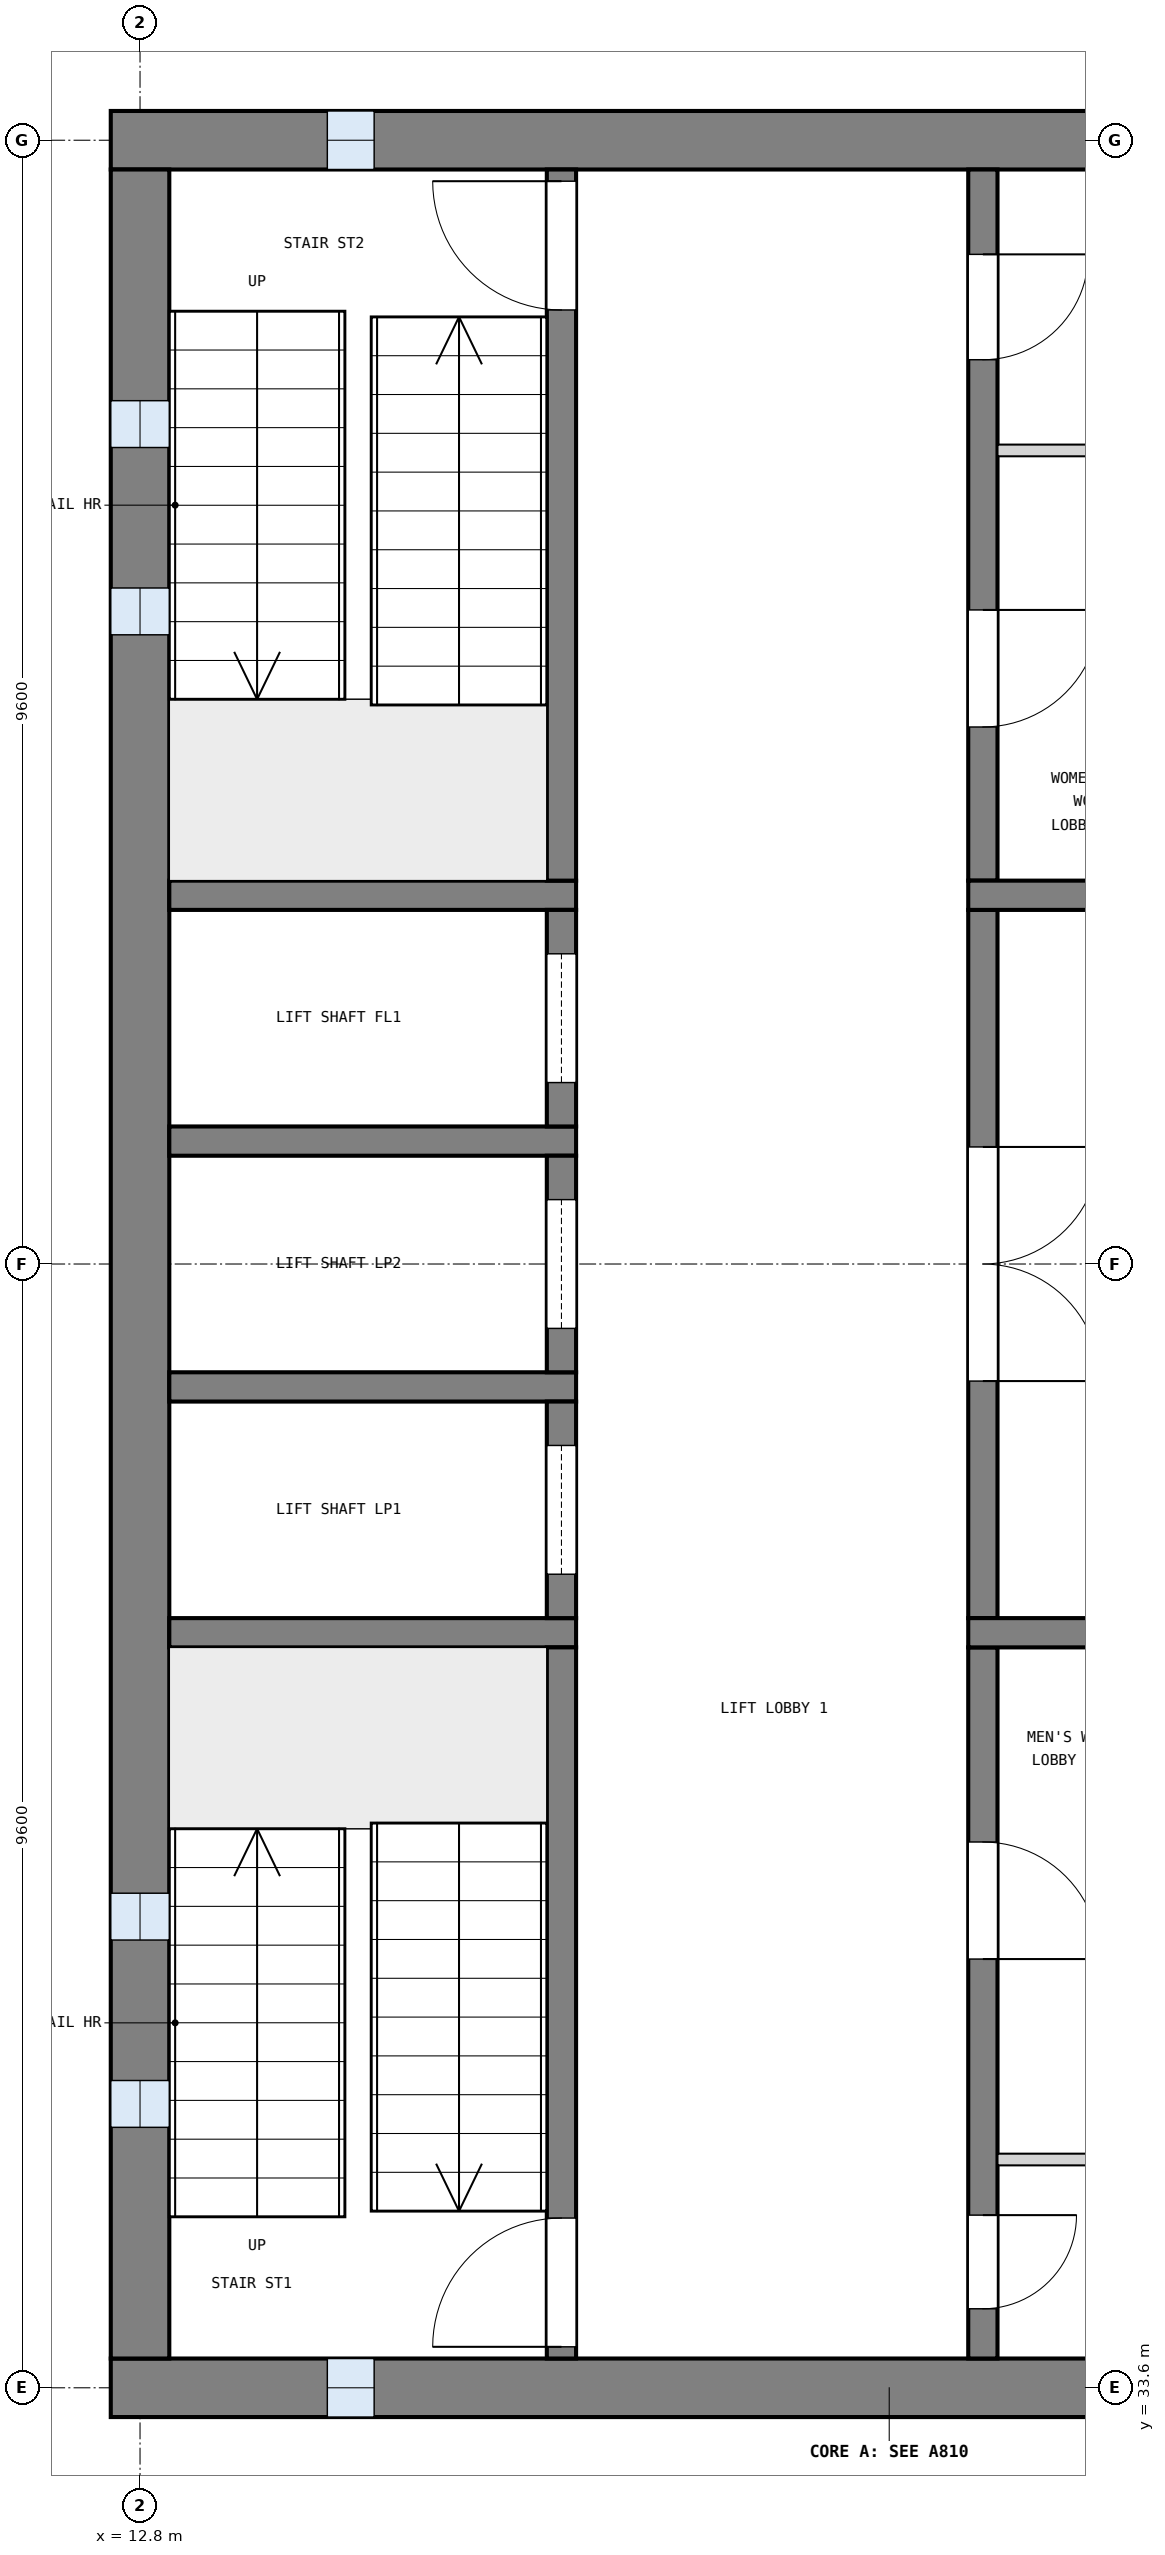
"""IFC4 building model, lengths in metres.
Left out: names, types, materials, properties, quantities, classifications, styles, units other than length and angle.
Written with IfcOpenShell. Run it as: python <this file> out.ifc"""

import sys

from ifc_helpers import new_model, si_unit, direction, frame, frame_2d, origin, place, context, subcontext, project, spatial, rectangle, extrude, element, fill, save


model = new_model("IFC4")
c1 = context("Model", 3, precision=1e-05, world=origin(), true_north=direction((0.0, 1.0)))
c2 = subcontext(c1, "Body", "Model", "MODEL_VIEW")
j1 = project(units=[si_unit("LENGTHUNIT", "METRE"), si_unit("PLANEANGLEUNIT", "RADIAN")], contexts=[c1])
p1 = place(None, origin())
s1 = spatial("IfcSite", under=j1, at=p1, CompositionType="ELEMENT")
p2 = place(p1, origin())
s2 = spatial("IfcBuilding", under=s1, at=p2, CompositionType="ELEMENT")
p3 = place(p2, frame((0.0, 0.0, 32.7)))
s3 = spatial("IfcBuildingStorey", under=s2, at=p3, CompositionType="ELEMENT", Elevation=32.7)
p4 = place(p3, frame((12.55, 52.8, 0.0), z_axis=(0.0, 0.0, 1.0), x_axis=(1.0, 0.0, 0.0)))
e1 = element("IfcWall", 1, at=p4, inside=s3, PredefinedType="SHEAR", context=c2, shape_type="SweptSolid", body=[
    extrude(rectangle(XDim=13.3, YDim=0.5, at=frame_2d((6.65, 0.0))), origin(), (0.0, 0.0, 1.0), 3.9),
])
p5 = place(p4, frame((1.85, 0.0, 1.0)))
e2 = element("IfcOpeningElement", 2, at=p5, cuts=e1, PredefinedType="OPENING", context=c2, shape_type="SweptSolid", body=[
    extrude(rectangle(XDim=0.4, YDim=2.0, at=frame_2d((0.2, 1.0))), frame((0.0, 0.26, 0.0), z_axis=(0.0, -1.0, 0.0), x_axis=(1.0, 0.0, 0.0)), (0.0, 0.0, 1.0), 0.52),
])
p6 = place(p3, frame((12.55, 33.6, 0.0), z_axis=(0.0, 0.0, 1.0), x_axis=(1.0, 0.0, 0.0)))
e3 = element("IfcWall", 3, at=p6, inside=s3, PredefinedType="SHEAR", context=c2, shape_type="SweptSolid", body=[
    extrude(rectangle(XDim=13.3, YDim=0.5, at=frame_2d((6.65, 0.0))), origin(), (0.0, 0.0, 1.0), 3.9),
])
p7 = place(p6, frame((1.85, 0.0, 1.0)))
e4 = element("IfcOpeningElement", 4, at=p7, cuts=e3, PredefinedType="OPENING", context=c2, shape_type="SweptSolid", body=[
    extrude(rectangle(XDim=0.4, YDim=2.0, at=frame_2d((0.2, 1.0))), frame((0.0, 0.26, 0.0), z_axis=(0.0, -1.0, 0.0), x_axis=(1.0, 0.0, 0.0)), (0.0, 0.0, 1.0), 0.52),
])
p8 = place(p3, frame((12.8, 33.85, 0.0), z_axis=(0.0, 0.0, 1.0), x_axis=(0.0, 1.0, 0.0)))
e5 = element("IfcWall", 5, at=p8, inside=s3, PredefinedType="SHEAR", context=c2, shape_type="SweptSolid", body=[
    extrude(rectangle(XDim=18.7, YDim=0.5, at=frame_2d((9.35, 0.0))), origin(), (0.0, 0.0, 1.0), 3.9),
])
p9 = place(p8, frame((1.975, 0.0, 1.0)))
e6 = element("IfcOpeningElement", 6, at=p9, cuts=e5, PredefinedType="OPENING", context=c2, shape_type="SweptSolid", body=[
    extrude(rectangle(XDim=0.4, YDim=2.0, at=frame_2d((0.2, 1.0))), frame((0.0, 0.26, 0.0), z_axis=(0.0, -1.0, 0.0), x_axis=(1.0, 0.0, 0.0)), (0.0, 0.0, 1.0), 0.52),
])
p10 = place(p8, frame((3.575, 0.0, 1.0)))
e7 = element("IfcOpeningElement", 7, at=p10, cuts=e5, PredefinedType="OPENING", context=c2, shape_type="SweptSolid", body=[
    extrude(rectangle(XDim=0.4, YDim=2.0, at=frame_2d((0.2, 1.0))), frame((0.0, 0.26, 0.0), z_axis=(0.0, -1.0, 0.0), x_axis=(1.0, 0.0, 0.0)), (0.0, 0.0, 1.0), 0.52),
])
p11 = place(p8, frame((14.725, 0.0, 1.0)))
e8 = element("IfcOpeningElement", 8, at=p11, cuts=e5, PredefinedType="OPENING", context=c2, shape_type="SweptSolid", body=[
    extrude(rectangle(XDim=0.4, YDim=2.0, at=frame_2d((0.2, 1.0))), frame((0.0, 0.26, 0.0), z_axis=(0.0, -1.0, 0.0), x_axis=(1.0, 0.0, 0.0)), (0.0, 0.0, 1.0), 0.52),
])
p12 = place(p8, frame((16.325, 0.0, 1.0)))
e9 = element("IfcOpeningElement", 9, at=p12, cuts=e5, PredefinedType="OPENING", context=c2, shape_type="SweptSolid", body=[
    extrude(rectangle(XDim=0.4, YDim=2.0, at=frame_2d((0.2, 1.0))), frame((0.0, 0.26, 0.0), z_axis=(0.0, -1.0, 0.0), x_axis=(1.0, 0.0, 0.0)), (0.0, 0.0, 1.0), 0.52),
])
for number, where, z_axis, x_axis in (
    (10, (13.05, 40.05, 0.0), (0.0, 0.0, 1.0), (1.0, 0.0, 0.0)),
    (11, (13.05, 42.15, 0.0), (0.0, 0.0, 1.0), (1.0, 0.0, 0.0)),
    (12, (13.05, 44.25, 0.0), (0.0, 0.0, 1.0), (1.0, 0.0, 0.0)),
    (13, (13.05, 46.35, 0.0), (0.0, 0.0, 1.0), (1.0, 0.0, 0.0)),
):
    element("IfcWall", number, at=place(p3, frame(where, z_axis=z_axis, x_axis=x_axis)), inside=s3, PredefinedType="SOLIDWALL", context=c2, shape_type="SweptSolid", body=[
        extrude(rectangle(XDim=3.475, YDim=0.25, at=frame_2d((1.737, 0.0))), origin(), (0.0, 0.0, 1.0), 3.6),
    ])
p13 = place(p3, frame((16.4, 33.85, 0.0), z_axis=(0.0, 0.0, 1.0), x_axis=(0.0, 1.0, 0.0)))
e14 = element("IfcWall", 14, at=p13, inside=s3, PredefinedType="SOLIDWALL", context=c2, shape_type="SweptSolid", body=[
    extrude(rectangle(XDim=6.075, YDim=0.25, at=frame_2d((3.038, 0.0))), origin(), (0.0, 0.0, 1.0), 3.6),
])
p14 = place(p13, frame((0.1, 0.0, 0.0)))
e15 = element("IfcOpeningElement", 15, at=p14, cuts=e14, PredefinedType="OPENING", context=c2, shape_type="SweptSolid", body=[
    extrude(rectangle(XDim=1.1, YDim=2.1, at=frame_2d((0.55, 1.05))), frame((0.0, 0.135, 0.0), z_axis=(0.0, -1.0, 0.0), x_axis=(1.0, 0.0, 0.0)), (0.0, 0.0, 1.0), 0.27),
])
p15 = place(p3, frame((16.4, 40.175, 0.0), z_axis=(0.0, 0.0, 1.0), x_axis=(0.0, 1.0, 0.0)))
e16 = element("IfcWall", 16, at=p15, inside=s3, PredefinedType="SOLIDWALL", context=c2, shape_type="SweptSolid", body=[
    extrude(rectangle(XDim=1.85, YDim=0.25, at=frame_2d((0.925, 0.0))), origin(), (0.0, 0.0, 1.0), 3.6),
])
p16 = place(p15, frame((0.375, 0.0, 0.0)))
e17 = element("IfcOpeningElement", 17, at=p16, cuts=e16, PredefinedType="OPENING", context=c2, shape_type="SweptSolid", body=[
    extrude(rectangle(XDim=1.1, YDim=2.1, at=frame_2d((0.55, 1.05))), frame((0.0, 0.135, 0.0), z_axis=(0.0, -1.0, 0.0), x_axis=(1.0, 0.0, 0.0)), (0.0, 0.0, 1.0), 0.27),
])
p17 = place(p3, frame((16.4, 42.275, 0.0), z_axis=(0.0, 0.0, 1.0), x_axis=(0.0, 1.0, 0.0)))
e18 = element("IfcWall", 18, at=p17, inside=s3, PredefinedType="SOLIDWALL", context=c2, shape_type="SweptSolid", body=[
    extrude(rectangle(XDim=1.85, YDim=0.25, at=frame_2d((0.925, 0.0))), origin(), (0.0, 0.0, 1.0), 3.6),
])
p18 = place(p17, frame((0.375, 0.0, 0.0)))
e19 = element("IfcOpeningElement", 19, at=p18, cuts=e18, PredefinedType="OPENING", context=c2, shape_type="SweptSolid", body=[
    extrude(rectangle(XDim=1.1, YDim=2.1, at=frame_2d((0.55, 1.05))), frame((0.0, 0.135, 0.0), z_axis=(0.0, -1.0, 0.0), x_axis=(1.0, 0.0, 0.0)), (0.0, 0.0, 1.0), 0.27),
])
p19 = place(p3, frame((16.4, 44.375, 0.0), z_axis=(0.0, 0.0, 1.0), x_axis=(0.0, 1.0, 0.0)))
e20 = element("IfcWall", 20, at=p19, inside=s3, PredefinedType="SOLIDWALL", context=c2, shape_type="SweptSolid", body=[
    extrude(rectangle(XDim=1.85, YDim=0.25, at=frame_2d((0.925, 0.0))), origin(), (0.0, 0.0, 1.0), 3.6),
])
p20 = place(p19, frame((0.375, 0.0, 0.0)))
e21 = element("IfcOpeningElement", 21, at=p20, cuts=e20, PredefinedType="OPENING", context=c2, shape_type="SweptSolid", body=[
    extrude(rectangle(XDim=1.1, YDim=2.1, at=frame_2d((0.55, 1.05))), frame((0.0, 0.135, 0.0), z_axis=(0.0, -1.0, 0.0), x_axis=(1.0, 0.0, 0.0)), (0.0, 0.0, 1.0), 0.27),
])
p21 = place(p3, frame((16.4, 46.475, 0.0), z_axis=(0.0, 0.0, 1.0), x_axis=(0.0, 1.0, 0.0)))
e22 = element("IfcWall", 22, at=p21, inside=s3, PredefinedType="SOLIDWALL", context=c2, shape_type="SweptSolid", body=[
    extrude(rectangle(XDim=6.075, YDim=0.25, at=frame_2d((3.038, 0.0))), origin(), (0.0, 0.0, 1.0), 3.6),
])
p22 = place(p21, frame((4.875, 0.0, 0.0)))
e23 = element("IfcOpeningElement", 23, at=p22, cuts=e22, PredefinedType="OPENING", context=c2, shape_type="SweptSolid", body=[
    extrude(rectangle(XDim=1.1, YDim=2.1, at=frame_2d((0.55, 1.05))), frame((0.0, 0.135, 0.0), z_axis=(0.0, -1.0, 0.0), x_axis=(1.0, 0.0, 0.0)), (0.0, 0.0, 1.0), 0.27),
])
p23 = place(p3, frame((20.0, 33.85, 0.0), z_axis=(0.0, 0.0, 1.0), x_axis=(0.0, 1.0, 0.0)))
e24 = element("IfcWall", 24, at=p23, inside=s3, PredefinedType="SOLIDWALL", context=c2, shape_type="SweptSolid", body=[
    extrude(rectangle(XDim=6.075, YDim=0.25, at=frame_2d((3.038, 0.0))), origin(), (0.0, 0.0, 1.0), 3.6),
])
p24 = place(p23, frame((0.425, 0.0, 0.0)))
e25 = element("IfcOpeningElement", 25, at=p24, cuts=e24, PredefinedType="OPENING", context=c2, shape_type="SweptSolid", body=[
    extrude(rectangle(XDim=0.8, YDim=2.1, at=frame_2d((0.4, 1.05))), frame((0.0, 0.135, 0.0), z_axis=(0.0, -1.0, 0.0), x_axis=(1.0, 0.0, 0.0)), (0.0, 0.0, 1.0), 0.27),
])
p25 = place(p23, frame((3.413, 0.0, 0.0)))
e26 = element("IfcOpeningElement", 26, at=p25, cuts=e24, PredefinedType="OPENING", context=c2, shape_type="SweptSolid", body=[
    extrude(rectangle(XDim=1.0, YDim=2.1, at=frame_2d((0.5, 1.05))), frame((0.0, 0.135, 0.0), z_axis=(0.0, -1.0, 0.0), x_axis=(1.0, 0.0, 0.0)), (0.0, 0.0, 1.0), 0.27),
])
p26 = place(p3, frame((20.0, 40.175, 0.0), z_axis=(0.0, 0.0, 1.0), x_axis=(0.0, 1.0, 0.0)))
e27 = element("IfcWall", 27, at=p26, inside=s3, PredefinedType="SOLIDWALL", context=c2, shape_type="SweptSolid", body=[
    extrude(rectangle(XDim=6.05, YDim=0.25, at=frame_2d((3.025, 0.0))), origin(), (0.0, 0.0, 1.0), 3.6),
])
p27 = place(p26, frame((2.025, 0.0, 0.0)))
e28 = element("IfcOpeningElement", 28, at=p27, cuts=e27, PredefinedType="OPENING", context=c2, shape_type="SweptSolid", body=[
    extrude(rectangle(XDim=2.0, YDim=2.1, at=frame_2d((1.0, 1.05))), frame((0.0, 0.135, 0.0), z_axis=(0.0, -1.0, 0.0), x_axis=(1.0, 0.0, 0.0)), (0.0, 0.0, 1.0), 0.27),
])
p28 = place(p3, frame((20.0, 46.475, 0.0), z_axis=(0.0, 0.0, 1.0), x_axis=(0.0, 1.0, 0.0)))
e29 = element("IfcWall", 29, at=p28, inside=s3, PredefinedType="SOLIDWALL", context=c2, shape_type="SweptSolid", body=[
    extrude(rectangle(XDim=6.075, YDim=0.25, at=frame_2d((3.038, 0.0))), origin(), (0.0, 0.0, 1.0), 3.6),
])
p29 = place(p28, frame((1.312, 0.0, 0.0)))
e30 = element("IfcOpeningElement", 30, at=p29, cuts=e29, PredefinedType="OPENING", context=c2, shape_type="SweptSolid", body=[
    extrude(rectangle(XDim=1.0, YDim=2.1, at=frame_2d((0.5, 1.05))), frame((0.0, 0.135, 0.0), z_axis=(0.0, -1.0, 0.0), x_axis=(1.0, 0.0, 0.0)), (0.0, 0.0, 1.0), 0.27),
])
p30 = place(p28, frame((4.45, 0.0, 0.0)))
e31 = element("IfcOpeningElement", 31, at=p30, cuts=e29, PredefinedType="OPENING", context=c2, shape_type="SweptSolid", body=[
    extrude(rectangle(XDim=0.9, YDim=2.1, at=frame_2d((0.45, 1.05))), frame((0.0, 0.135, 0.0), z_axis=(0.0, -1.0, 0.0), x_axis=(1.0, 0.0, 0.0)), (0.0, 0.0, 1.0), 0.27),
])
for number, where, z_axis, x_axis in (
    (32, (19.875, 40.05, 0.0), (0.0, 0.0, 1.0), (1.0, 0.0, 0.0)),
    (33, (19.875, 46.35, 0.0), (0.0, 0.0, 1.0), (1.0, 0.0, 0.0)),
):
    element("IfcWall", number, at=place(p3, frame(where, z_axis=z_axis, x_axis=x_axis)), inside=s3, PredefinedType="SOLIDWALL", context=c2, shape_type="SweptSolid", body=[
        extrude(rectangle(XDim=5.475, YDim=0.25, at=frame_2d((2.738, 0.0))), origin(), (0.0, 0.0, 1.0), 3.6),
    ])
for number, where, z_axis, x_axis in (
    (34, (20.125, 35.55, 0.0), (0.0, 0.0, 1.0), (1.0, 0.0, 0.0)),
    (35, (20.125, 50.15, 0.0), (0.0, 0.0, 1.0), (1.0, 0.0, 0.0)),
):
    element("IfcWall", number, at=place(p3, frame(where, z_axis=z_axis, x_axis=x_axis)), inside=s3, PredefinedType="PARTITIONING", context=c2, shape_type="SweptSolid", body=[
        extrude(rectangle(XDim=5.225, YDim=0.1, at=frame_2d((2.613, 0.0))), origin(), (0.0, 0.0, 1.0), 3.6),
    ])
p31 = place(p9, origin())
e36 = element("IfcWindow", 36, at=p31, inside=s3, PartitioningType="SINGLE_PANEL", PredefinedType="WINDOW", context=c2, shape_type="SweptSolid", body=[
    extrude(rectangle(XDim=0.4, YDim=2.0, at=frame_2d((0.2, 1.0))), frame((0.0, 0.03, 0.0), z_axis=(0.0, -1.0, 0.0), x_axis=(1.0, 0.0, 0.0)), (0.0, 0.0, 1.0), 0.06),
])
fill(e6, e36)
p32 = place(p10, origin())
e37 = element("IfcWindow", 37, at=p32, inside=s3, PartitioningType="SINGLE_PANEL", PredefinedType="WINDOW", context=c2, shape_type="SweptSolid", body=[
    extrude(rectangle(XDim=0.4, YDim=2.0, at=frame_2d((0.2, 1.0))), frame((0.0, 0.03, 0.0), z_axis=(0.0, -1.0, 0.0), x_axis=(1.0, 0.0, 0.0)), (0.0, 0.0, 1.0), 0.06),
])
fill(e7, e37)
p33 = place(p11, origin())
e38 = element("IfcWindow", 38, at=p33, inside=s3, PartitioningType="SINGLE_PANEL", PredefinedType="WINDOW", context=c2, shape_type="SweptSolid", body=[
    extrude(rectangle(XDim=0.4, YDim=2.0, at=frame_2d((0.2, 1.0))), frame((0.0, 0.03, 0.0), z_axis=(0.0, -1.0, 0.0), x_axis=(1.0, 0.0, 0.0)), (0.0, 0.0, 1.0), 0.06),
])
fill(e8, e38)
p34 = place(p12, origin())
e39 = element("IfcWindow", 39, at=p34, inside=s3, PartitioningType="SINGLE_PANEL", PredefinedType="WINDOW", context=c2, shape_type="SweptSolid", body=[
    extrude(rectangle(XDim=0.4, YDim=2.0, at=frame_2d((0.2, 1.0))), frame((0.0, 0.03, 0.0), z_axis=(0.0, -1.0, 0.0), x_axis=(1.0, 0.0, 0.0)), (0.0, 0.0, 1.0), 0.06),
])
fill(e9, e39)
p35 = place(p7, origin())
e40 = element("IfcWindow", 40, at=p35, inside=s3, PartitioningType="SINGLE_PANEL", PredefinedType="WINDOW", context=c2, shape_type="SweptSolid", body=[
    extrude(rectangle(XDim=0.4, YDim=2.0, at=frame_2d((0.2, 1.0))), frame((0.0, 0.03, 0.0), z_axis=(0.0, -1.0, 0.0), x_axis=(1.0, 0.0, 0.0)), (0.0, 0.0, 1.0), 0.06),
])
fill(e4, e40)
p36 = place(p5, origin())
e41 = element("IfcWindow", 41, at=p36, inside=s3, PartitioningType="SINGLE_PANEL", PredefinedType="WINDOW", context=c2, shape_type="SweptSolid", body=[
    extrude(rectangle(XDim=0.4, YDim=2.0, at=frame_2d((0.2, 1.0))), frame((0.0, 0.03, 0.0), z_axis=(0.0, -1.0, 0.0), x_axis=(1.0, 0.0, 0.0)), (0.0, 0.0, 1.0), 0.06),
])
fill(e2, e41)
p37 = place(p14, origin())
e42 = element("IfcDoor", 42, at=p37, inside=s3, OperationType="SINGLE_SWING_LEFT", PredefinedType="DOOR", context=c2, shape_type="SweptSolid", body=[
    extrude(rectangle(XDim=1.1, YDim=2.1, at=frame_2d((0.55, 1.05))), frame((0.0, 0.025, 0.0), z_axis=(0.0, -1.0, 0.0), x_axis=(1.0, 0.0, 0.0)), (0.0, 0.0, 1.0), 0.05),
])
fill(e15, e42)
p38 = place(p22, origin())
e43 = element("IfcDoor", 43, at=p38, inside=s3, OperationType="SINGLE_SWING_RIGHT", PredefinedType="DOOR", context=c2, shape_type="SweptSolid", body=[
    extrude(rectangle(XDim=1.1, YDim=2.1, at=frame_2d((0.55, 1.05))), frame((0.0, 0.025, 0.0), z_axis=(0.0, -1.0, 0.0), x_axis=(1.0, 0.0, 0.0)), (0.0, 0.0, 1.0), 0.05),
])
fill(e23, e43)
p39 = place(p16, origin())
e44 = element("IfcDoor", 44, at=p39, inside=s3, OperationType="SLIDING_TO_LEFT", PredefinedType="DOOR", context=c2, shape_type="SweptSolid", body=[
    extrude(rectangle(XDim=1.1, YDim=2.1, at=frame_2d((0.55, 1.05))), frame((0.0, 0.025, 0.0), z_axis=(0.0, -1.0, 0.0), x_axis=(1.0, 0.0, 0.0)), (0.0, 0.0, 1.0), 0.05),
])
fill(e17, e44)
p40 = place(p18, origin())
e45 = element("IfcDoor", 45, at=p40, inside=s3, OperationType="SLIDING_TO_LEFT", PredefinedType="DOOR", context=c2, shape_type="SweptSolid", body=[
    extrude(rectangle(XDim=1.1, YDim=2.1, at=frame_2d((0.55, 1.05))), frame((0.0, 0.025, 0.0), z_axis=(0.0, -1.0, 0.0), x_axis=(1.0, 0.0, 0.0)), (0.0, 0.0, 1.0), 0.05),
])
fill(e19, e45)
p41 = place(p20, origin())
e46 = element("IfcDoor", 46, at=p41, inside=s3, OperationType="SLIDING_TO_LEFT", PredefinedType="DOOR", context=c2, shape_type="SweptSolid", body=[
    extrude(rectangle(XDim=1.1, YDim=2.1, at=frame_2d((0.55, 1.05))), frame((0.0, 0.025, 0.0), z_axis=(0.0, -1.0, 0.0), x_axis=(1.0, 0.0, 0.0)), (0.0, 0.0, 1.0), 0.05),
])
fill(e21, e46)
p42 = place(p27, frame((2.0, 0.0, 0.0), z_axis=(0.0, 0.0, 1.0), x_axis=(-1.0, 0.0, 0.0)))
e47 = element("IfcDoor", 47, at=p42, inside=s3, OperationType="DOUBLE_DOOR_SINGLE_SWING", PredefinedType="DOOR", context=c2, shape_type="SweptSolid", body=[
    extrude(rectangle(XDim=2.0, YDim=2.1, at=frame_2d((1.0, 1.05))), frame((0.0, 0.025, 0.0), z_axis=(0.0, -1.0, 0.0), x_axis=(1.0, 0.0, 0.0)), (0.0, 0.0, 1.0), 0.05),
])
fill(e28, e47)
p43 = place(p24, frame((0.8, 0.0, 0.0), z_axis=(0.0, 0.0, 1.0), x_axis=(-1.0, 0.0, 0.0)))
e48 = element("IfcDoor", 48, at=p43, inside=s3, OperationType="SINGLE_SWING_LEFT", PredefinedType="DOOR", context=c2, shape_type="SweptSolid", body=[
    extrude(rectangle(XDim=0.8, YDim=2.1, at=frame_2d((0.4, 1.05))), frame((0.0, 0.025, 0.0), z_axis=(0.0, -1.0, 0.0), x_axis=(1.0, 0.0, 0.0)), (0.0, 0.0, 1.0), 0.05),
])
fill(e25, e48)
p44 = place(p25, frame((1.0, 0.0, 0.0), z_axis=(0.0, 0.0, 1.0), x_axis=(-1.0, 0.0, 0.0)))
e49 = element("IfcDoor", 49, at=p44, inside=s3, OperationType="SINGLE_SWING_RIGHT", PredefinedType="DOOR", context=c2, shape_type="SweptSolid", body=[
    extrude(rectangle(XDim=1.0, YDim=2.1, at=frame_2d((0.5, 1.05))), frame((0.0, 0.025, 0.0), z_axis=(0.0, -1.0, 0.0), x_axis=(1.0, 0.0, 0.0)), (0.0, 0.0, 1.0), 0.05),
])
fill(e26, e49)
p45 = place(p29, frame((1.0, 0.0, 0.0), z_axis=(0.0, 0.0, 1.0), x_axis=(-1.0, 0.0, 0.0)))
e50 = element("IfcDoor", 50, at=p45, inside=s3, OperationType="SINGLE_SWING_LEFT", PredefinedType="DOOR", context=c2, shape_type="SweptSolid", body=[
    extrude(rectangle(XDim=1.0, YDim=2.1, at=frame_2d((0.5, 1.05))), frame((0.0, 0.025, 0.0), z_axis=(0.0, -1.0, 0.0), x_axis=(1.0, 0.0, 0.0)), (0.0, 0.0, 1.0), 0.05),
])
fill(e30, e50)
p46 = place(p30, frame((0.9, 0.0, 0.0), z_axis=(0.0, 0.0, 1.0), x_axis=(-1.0, 0.0, 0.0)))
e51 = element("IfcDoor", 51, at=p46, inside=s3, OperationType="SINGLE_SWING_LEFT", PredefinedType="DOOR", context=c2, shape_type="SweptSolid", body=[
    extrude(rectangle(XDim=0.9, YDim=2.1, at=frame_2d((0.45, 1.05))), frame((0.0, 0.025, 0.0), z_axis=(0.0, -1.0, 0.0), x_axis=(1.0, 0.0, 0.0)), (0.0, 0.0, 1.0), 0.05),
])
fill(e31, e51)
save(model, sys.argv[1])
